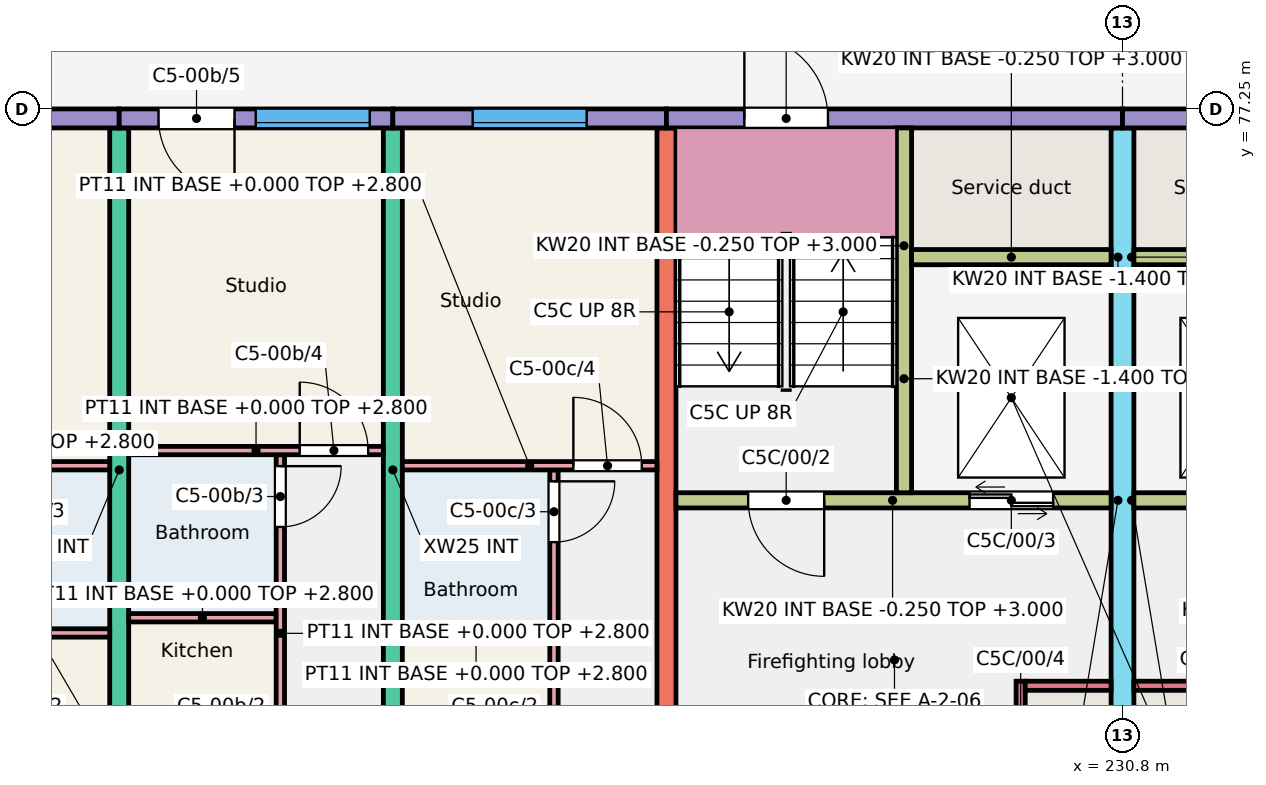
"""IFC4 building model, lengths in metres.
Left out: names, types, materials, properties, quantities, classifications, styles, units other than length and angle.
Written with IfcOpenShell. Run it as: python <this file> out.ifc"""

import sys

from ifc_helpers import new_model, si_unit, direction, frame, frame_2d, origin, place, context, subcontext, project, spatial, rectangle, extrude, element, fill, save


model = new_model("IFC4")
c1 = context("Model", 3, precision=1e-05, world=origin(), true_north=direction((0.0, 1.0)))
c2 = subcontext(c1, "Body", "Model", "MODEL_VIEW")
j1 = project(units=[si_unit("LENGTHUNIT", "METRE"), si_unit("PLANEANGLEUNIT", "RADIAN")], contexts=[c1])
p1 = place(None, origin())
s1 = spatial("IfcSite", under=j1, at=p1, CompositionType="ELEMENT")
p2 = place(p1, origin())
s2 = spatial("IfcBuilding", under=s1, at=p2, CompositionType="ELEMENT")
p3 = place(p2, origin())
s3 = spatial("IfcBuildingStorey", under=s2, at=p3, CompositionType="ELEMENT", Elevation=0.0)
for number, where, z_axis, x_axis in (
    (1, (217.6, 68.0, -0.25), (0.0, 0.0, 1.0), (0.0, 1.0, 0.0)),
    (2, (221.2, 68.0, -0.25), (0.0, 0.0, 1.0), (0.0, 1.0, 0.0)),
    (3, (224.8, 68.0, -0.25), (0.0, 0.0, 1.0), (0.0, 1.0, 0.0)),
):
    element("IfcWall", number, at=place(p3, frame(where, z_axis=z_axis, x_axis=x_axis)), inside=s3, PredefinedType="SHEAR", context=c2, shape_type="SweptSolid", body=[
        extrude(rectangle(XDim=9.0, YDim=0.25, at=frame_2d((4.5, 0.0))), origin(), (0.0, 0.0, 1.0), 3.25),
    ])
p4 = place(p3, frame((230.8, 66.0, -0.25), z_axis=(0.0, 0.0, 1.0), x_axis=(0.0, 1.0, 0.0)))
e4 = element("IfcWall", 4, at=p4, inside=s3, PredefinedType="SHEAR", context=c2, shape_type="SweptSolid", body=[
    extrude(rectangle(XDim=11.0, YDim=0.3, at=frame_2d((5.5, 0.0))), origin(), (0.0, 0.0, 1.0), 3.25),
])
p5 = place(p4, frame((0.3, 0.0, 0.25)))
e5 = element("IfcOpeningElement", 5, at=p5, cuts=e4, PredefinedType="OPENING", context=c2, shape_type="SweptSolid", body=[
    extrude(rectangle(XDim=1.2, YDim=2.1, at=frame_2d((0.6, 1.05))), frame((0.0, 0.16, 0.0), z_axis=(0.0, -1.0, 0.0), x_axis=(1.0, 0.0, 0.0)), (0.0, 0.0, 1.0), 0.32),
])
p6 = place(p3, frame((214.0, 77.125, -0.25), z_axis=(0.0, 0.0, 1.0), x_axis=(1.0, 0.0, 0.0)))
e6 = element("IfcWall", 6, at=p6, inside=s3, PredefinedType="SOLIDWALL", context=c2, shape_type="SweptSolid", body=[
    extrude(rectangle(XDim=3.6, YDim=0.25, at=frame_2d((1.8, 0.0))), origin(), (0.0, 0.0, 1.0), 3.25),
])
p7 = place(p6, frame((1.062, 0.0, 1.15)))
e7 = element("IfcOpeningElement", 7, at=p7, cuts=e6, PredefinedType="OPENING", context=c2, shape_type="SweptSolid", body=[
    extrude(rectangle(XDim=1.5, YDim=1.5, at=frame_2d((0.75, 0.75))), frame((0.0, 0.135, 0.0), z_axis=(0.0, -1.0, 0.0), x_axis=(1.0, 0.0, 0.0)), (0.0, 0.0, 1.0), 0.27),
])
p8 = place(p3, frame((217.6, 77.125, -0.25), z_axis=(0.0, 0.0, 1.0), x_axis=(1.0, 0.0, 0.0)))
e8 = element("IfcWall", 8, at=p8, inside=s3, PredefinedType="SOLIDWALL", context=c2, shape_type="SweptSolid", body=[
    extrude(rectangle(XDim=3.6, YDim=0.25, at=frame_2d((1.8, 0.0))), origin(), (0.0, 0.0, 1.0), 3.25),
])
p9 = place(p8, frame((1.796, 0.0, 1.15)))
e9 = element("IfcOpeningElement", 9, at=p9, cuts=e8, PredefinedType="OPENING", context=c2, shape_type="SweptSolid", body=[
    extrude(rectangle(XDim=1.5, YDim=1.5, at=frame_2d((0.75, 0.75))), frame((0.0, 0.135, 0.0), z_axis=(0.0, -1.0, 0.0), x_axis=(1.0, 0.0, 0.0)), (0.0, 0.0, 1.0), 0.27),
])
p10 = place(p8, frame((0.517, 0.0, 0.25)))
e10 = element("IfcOpeningElement", 10, at=p10, cuts=e8, PredefinedType="OPENING", context=c2, shape_type="SweptSolid", body=[
    extrude(rectangle(XDim=1.0, YDim=2.1, at=frame_2d((0.5, 1.05))), frame((0.0, 0.135, 0.0), z_axis=(0.0, -1.0, 0.0), x_axis=(1.0, 0.0, 0.0)), (0.0, 0.0, 1.0), 0.27),
])
p11 = place(p3, frame((221.2, 77.125, -0.25), z_axis=(0.0, 0.0, 1.0), x_axis=(1.0, 0.0, 0.0)))
e11 = element("IfcWall", 11, at=p11, inside=s3, PredefinedType="SOLIDWALL", context=c2, shape_type="SweptSolid", body=[
    extrude(rectangle(XDim=3.6, YDim=0.25, at=frame_2d((1.8, 0.0))), origin(), (0.0, 0.0, 1.0), 3.25),
])
p12 = place(p11, frame((1.05, 0.0, 1.15)))
e12 = element("IfcOpeningElement", 12, at=p12, cuts=e11, PredefinedType="OPENING", context=c2, shape_type="SweptSolid", body=[
    extrude(rectangle(XDim=1.5, YDim=1.5, at=frame_2d((0.75, 0.75))), frame((0.0, 0.135, 0.0), z_axis=(0.0, -1.0, 0.0), x_axis=(1.0, 0.0, 0.0)), (0.0, 0.0, 1.0), 0.27),
])
p13 = place(p3, frame((224.8, 77.125, -0.25), z_axis=(0.0, 0.0, 1.0), x_axis=(1.0, 0.0, 0.0)))
e13 = element("IfcWall", 13, at=p13, inside=s3, PredefinedType="SOLIDWALL", context=c2, shape_type="SweptSolid", body=[
    extrude(rectangle(XDim=6.0, YDim=0.25, at=frame_2d((3.0, 0.0))), origin(), (0.0, 0.0, 1.0), 3.25),
])
p14 = place(p13, frame((1.025, 0.0, 0.25)))
e14 = element("IfcOpeningElement", 14, at=p14, cuts=e13, PredefinedType="OPENING", context=c2, shape_type="SweptSolid", body=[
    extrude(rectangle(XDim=1.1, YDim=2.1, at=frame_2d((0.55, 1.05))), frame((0.0, 0.135, 0.0), z_axis=(0.0, -1.0, 0.0), x_axis=(1.0, 0.0, 0.0)), (0.0, 0.0, 1.0), 0.27),
])
p15 = place(p3, frame((224.925, 72.1, -0.25), z_axis=(0.0, 0.0, 1.0), x_axis=(1.0, 0.0, 0.0)))
e15 = element("IfcWall", 15, at=p15, inside=s3, PredefinedType="SHEAR", context=c2, shape_type="SweptSolid", body=[
    extrude(rectangle(XDim=5.725, YDim=0.2, at=frame_2d((2.862, 0.0))), origin(), (0.0, 0.0, 1.0), 3.25),
])
p16 = place(p15, frame((0.95, 0.0, 0.25)))
e16 = element("IfcOpeningElement", 16, at=p16, cuts=e15, PredefinedType="OPENING", context=c2, shape_type="SweptSolid", body=[
    extrude(rectangle(XDim=1.0, YDim=2.1, at=frame_2d((0.5, 1.05))), frame((0.0, 0.11, 0.0), z_axis=(0.0, -1.0, 0.0), x_axis=(1.0, 0.0, 0.0)), (0.0, 0.0, 1.0), 0.22),
])
p17 = place(p15, frame((3.863, 0.0, 0.25)))
e17 = element("IfcOpeningElement", 17, at=p17, cuts=e15, PredefinedType="OPENING", context=c2, shape_type="SweptSolid", body=[
    extrude(rectangle(XDim=1.1, YDim=2.1, at=frame_2d((0.55, 1.05))), frame((0.0, 0.11, 0.0), z_axis=(0.0, -1.0, 0.0), x_axis=(1.0, 0.0, 0.0)), (0.0, 0.0, 1.0), 0.22),
])
p18 = place(p3, frame((227.925, 72.2, -0.25), z_axis=(0.0, 0.0, 1.0), x_axis=(0.0, 1.0, 0.0)))
e18 = element("IfcWall", 18, at=p18, inside=s3, PredefinedType="SHEAR", context=c2, shape_type="SweptSolid", body=[
    extrude(rectangle(XDim=4.8, YDim=0.2, at=frame_2d((2.4, 0.0))), origin(), (0.0, 0.0, 1.0), 3.25),
])
p19 = place(p3, frame((228.025, 75.3, -0.25), z_axis=(0.0, 0.0, 1.0), x_axis=(1.0, 0.0, 0.0)))
e19 = element("IfcWall", 19, at=p19, inside=s3, PredefinedType="SHEAR", context=c2, shape_type="SweptSolid", body=[
    extrude(rectangle(XDim=2.625, YDim=0.2, at=frame_2d((1.312, 0.0))), origin(), (0.0, 0.0, 1.0), 3.25),
])
p20 = place(p3, frame((229.46, 68.0, -0.25), z_axis=(0.0, 0.0, 1.0), x_axis=(0.0, 1.0, 0.0)))
e20 = element("IfcWall", 20, at=p20, inside=s3, PredefinedType="SHEAR", context=c2, shape_type="SweptSolid", body=[
    extrude(rectangle(XDim=1.72, YDim=0.12, at=frame_2d((0.86, 0.0))), origin(), (0.0, 0.0, 1.0), 3.25),
])
p21 = place(p20, frame((0.45, 0.0, 0.25)))
e21 = element("IfcOpeningElement", 21, at=p21, cuts=e20, PredefinedType="OPENING", context=c2, shape_type="SweptSolid", body=[
    extrude(rectangle(XDim=0.9, YDim=2.1, at=frame_2d((0.45, 1.05))), frame((0.0, 0.07, 0.0), z_axis=(0.0, -1.0, 0.0), x_axis=(1.0, 0.0, 0.0)), (0.0, 0.0, 1.0), 0.14),
])
p22 = place(p3, frame((229.52, 69.66, -0.25), z_axis=(0.0, 0.0, 1.0), x_axis=(1.0, 0.0, 0.0)))
e22 = element("IfcWall", 22, at=p22, inside=s3, PredefinedType="SHEAR", context=c2, shape_type="SweptSolid", body=[
    extrude(rectangle(XDim=1.13, YDim=0.12, at=frame_2d((0.565, 0.0))), origin(), (0.0, 0.0, 1.0), 3.25),
])
p23 = place(p3, frame((230.8, 77.125, -0.25), z_axis=(0.0, 0.0, 1.0), x_axis=(1.0, 0.0, 0.0)))
e23 = element("IfcWall", 23, at=p23, inside=s3, PredefinedType="SOLIDWALL", context=c2, shape_type="SweptSolid", body=[
    extrude(rectangle(XDim=6.0, YDim=0.25, at=frame_2d((3.0, 0.0))), origin(), (0.0, 0.0, 1.0), 3.25),
])
p24 = place(p23, frame((3.875, 0.0, 0.25)))
e24 = element("IfcOpeningElement", 24, at=p24, cuts=e23, PredefinedType="OPENING", context=c2, shape_type="SweptSolid", body=[
    extrude(rectangle(XDim=1.1, YDim=2.1, at=frame_2d((0.55, 1.05))), frame((0.0, 0.135, 0.0), z_axis=(0.0, -1.0, 0.0), x_axis=(1.0, 0.0, 0.0)), (0.0, 0.0, 1.0), 0.27),
])
p25 = place(p3, frame((230.95, 72.1, -0.25), z_axis=(0.0, 0.0, 1.0), x_axis=(1.0, 0.0, 0.0)))
e25 = element("IfcWall", 25, at=p25, inside=s3, PredefinedType="SHEAR", context=c2, shape_type="SweptSolid", body=[
    extrude(rectangle(XDim=5.725, YDim=0.2, at=frame_2d((2.863, 0.0))), origin(), (0.0, 0.0, 1.0), 3.25),
])
p26 = place(p25, frame((3.775, 0.0, 0.25)))
e26 = element("IfcOpeningElement", 26, at=p26, cuts=e25, PredefinedType="OPENING", context=c2, shape_type="SweptSolid", body=[
    extrude(rectangle(XDim=1.0, YDim=2.1, at=frame_2d((0.5, 1.05))), frame((0.0, 0.11, 0.0), z_axis=(0.0, -1.0, 0.0), x_axis=(1.0, 0.0, 0.0)), (0.0, 0.0, 1.0), 0.22),
])
p27 = place(p25, frame((0.762, 0.0, 0.25)))
e27 = element("IfcOpeningElement", 27, at=p27, cuts=e25, PredefinedType="OPENING", context=c2, shape_type="SweptSolid", body=[
    extrude(rectangle(XDim=1.1, YDim=2.1, at=frame_2d((0.55, 1.05))), frame((0.0, 0.11, 0.0), z_axis=(0.0, -1.0, 0.0), x_axis=(1.0, 0.0, 0.0)), (0.0, 0.0, 1.0), 0.22),
])
p28 = place(p3, frame((230.95, 75.3, -0.25), z_axis=(0.0, 0.0, 1.0), x_axis=(1.0, 0.0, 0.0)))
e28 = element("IfcWall", 28, at=p28, inside=s3, PredefinedType="SHEAR", context=c2, shape_type="SweptSolid", body=[
    extrude(rectangle(XDim=2.625, YDim=0.2, at=frame_2d((1.312, 0.0))), origin(), (0.0, 0.0, 1.0), 3.25),
])
p29 = place(p3, frame((230.95, 69.66, -0.25), z_axis=(0.0, 0.0, 1.0), x_axis=(1.0, 0.0, 0.0)))
e29 = element("IfcWall", 29, at=p29, inside=s3, PredefinedType="SHEAR", context=c2, shape_type="SweptSolid", body=[
    extrude(rectangle(XDim=1.13, YDim=0.12, at=frame_2d((0.565, 0.0))), origin(), (0.0, 0.0, 1.0), 3.25),
])
for number, where, z_axis, x_axis in (
    (30, (227.825, 72.1, -1.4), (0.0, 0.0, 1.0), (1.0, 0.0, 0.0)),
    (31, (227.825, 75.3, -1.4), (0.0, 0.0, 1.0), (1.0, 0.0, 0.0)),
):
    element("IfcWall", number, at=place(p3, frame(where, z_axis=z_axis, x_axis=x_axis)), inside=s3, PredefinedType="SHEAR", context=c2, shape_type="SweptSolid", body=[
        extrude(rectangle(XDim=2.975, YDim=0.2, at=frame_2d((1.488, 0.0))), origin(), (0.0, 0.0, 1.0), 1.15),
    ])
p30 = place(p3, frame((227.925, 72.2, -1.4), z_axis=(0.0, 0.0, 1.0), x_axis=(0.0, 1.0, 0.0)))
e32 = element("IfcWall", 32, at=p30, inside=s3, PredefinedType="SHEAR", context=c2, shape_type="SweptSolid", body=[
    extrude(rectangle(XDim=3.0, YDim=0.2, at=frame_2d((1.5, 0.0))), origin(), (0.0, 0.0, 1.0), 1.15),
])
p31 = place(p3, frame((230.725, 72.2, -1.4), z_axis=(0.0, 0.0, 1.0), x_axis=(0.0, 1.0, 0.0)))
e33 = element("IfcWall", 33, at=p31, inside=s3, PredefinedType="SHEAR", context=c2, shape_type="SweptSolid", body=[
    extrude(rectangle(XDim=3.0, YDim=0.15, at=frame_2d((1.5, 0.0))), origin(), (0.0, 0.0, 1.0), 1.15),
])
for number, where, z_axis, x_axis in (
    (34, (230.8, 72.1, -1.4), (0.0, 0.0, 1.0), (1.0, 0.0, 0.0)),
    (35, (230.8, 75.3, -1.4), (0.0, 0.0, 1.0), (1.0, 0.0, 0.0)),
):
    element("IfcWall", number, at=place(p3, frame(where, z_axis=z_axis, x_axis=x_axis)), inside=s3, PredefinedType="SHEAR", context=c2, shape_type="SweptSolid", body=[
        extrude(rectangle(XDim=2.975, YDim=0.2, at=frame_2d((1.487, 0.0))), origin(), (0.0, 0.0, 1.0), 1.15),
    ])
p32 = place(p3, frame((230.875, 72.2, -1.4), z_axis=(0.0, 0.0, 1.0), x_axis=(0.0, 1.0, 0.0)))
e36 = element("IfcWall", 36, at=p32, inside=s3, PredefinedType="SHEAR", context=c2, shape_type="SweptSolid", body=[
    extrude(rectangle(XDim=3.0, YDim=0.15, at=frame_2d((1.5, 0.0))), origin(), (0.0, 0.0, 1.0), 1.15),
])
p33 = place(p3, frame((215.56, 70.355, 0.0), z_axis=(0.0, 0.0, 1.0), x_axis=(1.0, 0.0, 0.0)))
e37 = element("IfcWall", 37, at=p33, inside=s3, PredefinedType="PARTITIONING", context=c2, shape_type="SweptSolid", body=[
    extrude(rectangle(XDim=1.915, YDim=0.11, at=frame_2d((0.958, 0.0))), origin(), (0.0, 0.0, 1.0), 2.8),
])
p34 = place(p3, frame((214.15, 72.555, 0.0), z_axis=(0.0, 0.0, 1.0), x_axis=(1.0, 0.0, 0.0)))
e38 = element("IfcWall", 38, at=p34, inside=s3, PredefinedType="PARTITIONING", context=c2, shape_type="SweptSolid", body=[
    extrude(rectangle(XDim=3.325, YDim=0.11, at=frame_2d((1.663, 0.0))), origin(), (0.0, 0.0, 1.0), 2.8),
])
p35 = place(p34, frame((0.2, 0.0, 0.0)))
e39 = element("IfcOpeningElement", 39, at=p35, cuts=e38, PredefinedType="OPENING", context=c2, shape_type="SweptSolid", body=[
    extrude(rectangle(XDim=0.9, YDim=2.1, at=frame_2d((0.45, 1.05))), frame((0.0, 0.065, 0.0), z_axis=(0.0, -1.0, 0.0), x_axis=(1.0, 0.0, 0.0)), (0.0, 0.0, 1.0), 0.13),
])
p36 = place(p3, frame((217.725, 70.555, 0.0), z_axis=(0.0, 0.0, 1.0), x_axis=(1.0, 0.0, 0.0)))
e40 = element("IfcWall", 40, at=p36, inside=s3, PredefinedType="PARTITIONING", context=c2, shape_type="SweptSolid", body=[
    extrude(rectangle(XDim=1.94, YDim=0.11, at=frame_2d((0.97, 0.0))), origin(), (0.0, 0.0, 1.0), 2.8),
])
p37 = place(p3, frame((219.72, 68.0, 0.0), z_axis=(0.0, 0.0, 1.0), x_axis=(0.0, 1.0, 0.0)))
e41 = element("IfcWall", 41, at=p37, inside=s3, PredefinedType="PARTITIONING", context=c2, shape_type="SweptSolid", body=[
    extrude(rectangle(XDim=4.7, YDim=0.11, at=frame_2d((2.35, 0.0))), origin(), (0.0, 0.0, 1.0), 2.8),
])
p38 = place(p37, frame((0.2, 0.0, 0.0)))
e42 = element("IfcOpeningElement", 42, at=p38, cuts=e41, PredefinedType="OPENING", context=c2, shape_type="SweptSolid", body=[
    extrude(rectangle(XDim=0.8, YDim=2.1, at=frame_2d((0.4, 1.05))), frame((0.0, 0.065, 0.0), z_axis=(0.0, -1.0, 0.0), x_axis=(1.0, 0.0, 0.0)), (0.0, 0.0, 1.0), 0.13),
])
p39 = place(p37, frame((3.75, 0.0, 0.0)))
e43 = element("IfcOpeningElement", 43, at=p39, cuts=e41, PredefinedType="OPENING", context=c2, shape_type="SweptSolid", body=[
    extrude(rectangle(XDim=0.8, YDim=2.1, at=frame_2d((0.4, 1.05))), frame((0.0, 0.065, 0.0), z_axis=(0.0, -1.0, 0.0), x_axis=(1.0, 0.0, 0.0)), (0.0, 0.0, 1.0), 0.13),
])
p40 = place(p3, frame((217.725, 72.755, 0.0), z_axis=(0.0, 0.0, 1.0), x_axis=(1.0, 0.0, 0.0)))
e44 = element("IfcWall", 44, at=p40, inside=s3, PredefinedType="PARTITIONING", context=c2, shape_type="SweptSolid", body=[
    extrude(rectangle(XDim=3.35, YDim=0.11, at=frame_2d((1.675, 0.0))), origin(), (0.0, 0.0, 1.0), 2.8),
])
p41 = place(p40, frame((2.25, 0.0, 0.0)))
e45 = element("IfcOpeningElement", 45, at=p41, cuts=e44, PredefinedType="OPENING", context=c2, shape_type="SweptSolid", body=[
    extrude(rectangle(XDim=0.9, YDim=2.1, at=frame_2d((0.45, 1.05))), frame((0.0, 0.065, 0.0), z_axis=(0.0, -1.0, 0.0), x_axis=(1.0, 0.0, 0.0)), (0.0, 0.0, 1.0), 0.13),
])
p42 = place(p3, frame((221.325, 70.355, 0.0), z_axis=(0.0, 0.0, 1.0), x_axis=(1.0, 0.0, 0.0)))
e46 = element("IfcWall", 46, at=p42, inside=s3, PredefinedType="PARTITIONING", context=c2, shape_type="SweptSolid", body=[
    extrude(rectangle(XDim=1.94, YDim=0.11, at=frame_2d((0.97, 0.0))), origin(), (0.0, 0.0, 1.0), 2.8),
])
p43 = place(p3, frame((223.32, 68.0, 0.0), z_axis=(0.0, 0.0, 1.0), x_axis=(0.0, 1.0, 0.0)))
e47 = element("IfcWall", 47, at=p43, inside=s3, PredefinedType="PARTITIONING", context=c2, shape_type="SweptSolid", body=[
    extrude(rectangle(XDim=4.5, YDim=0.11, at=frame_2d((2.25, 0.0))), origin(), (0.0, 0.0, 1.0), 2.8),
])
p44 = place(p43, frame((0.2, 0.0, 0.0)))
e48 = element("IfcOpeningElement", 48, at=p44, cuts=e47, PredefinedType="OPENING", context=c2, shape_type="SweptSolid", body=[
    extrude(rectangle(XDim=0.8, YDim=2.1, at=frame_2d((0.4, 1.05))), frame((0.0, 0.065, 0.0), z_axis=(0.0, -1.0, 0.0), x_axis=(1.0, 0.0, 0.0)), (0.0, 0.0, 1.0), 0.13),
])
p45 = place(p43, frame((3.55, 0.0, 0.0)))
e49 = element("IfcOpeningElement", 49, at=p45, cuts=e47, PredefinedType="OPENING", context=c2, shape_type="SweptSolid", body=[
    extrude(rectangle(XDim=0.8, YDim=2.1, at=frame_2d((0.4, 1.05))), frame((0.0, 0.065, 0.0), z_axis=(0.0, -1.0, 0.0), x_axis=(1.0, 0.0, 0.0)), (0.0, 0.0, 1.0), 0.13),
])
p46 = place(p3, frame((221.325, 72.555, 0.0), z_axis=(0.0, 0.0, 1.0), x_axis=(1.0, 0.0, 0.0)))
e50 = element("IfcWall", 50, at=p46, inside=s3, PredefinedType="PARTITIONING", context=c2, shape_type="SweptSolid", body=[
    extrude(rectangle(XDim=3.35, YDim=0.11, at=frame_2d((1.675, 0.0))), origin(), (0.0, 0.0, 1.0), 2.8),
])
p47 = place(p46, frame((2.25, 0.0, 0.0)))
e51 = element("IfcOpeningElement", 51, at=p47, cuts=e50, PredefinedType="OPENING", context=c2, shape_type="SweptSolid", body=[
    extrude(rectangle(XDim=0.9, YDim=2.1, at=frame_2d((0.45, 1.05))), frame((0.0, 0.065, 0.0), z_axis=(0.0, -1.0, 0.0), x_axis=(1.0, 0.0, 0.0)), (0.0, 0.0, 1.0), 0.13),
])
p48 = place(p9, origin())
e52 = element("IfcWindow", 52, at=p48, inside=s3, PartitioningType="SINGLE_PANEL", PredefinedType="WINDOW", context=c2, shape_type="SweptSolid", body=[
    extrude(rectangle(XDim=1.5, YDim=1.5, at=frame_2d((0.75, 0.75))), frame((0.0, -0.025, 0.0), z_axis=(0.0, -1.0, 0.0), x_axis=(1.0, 0.0, 0.0)), (0.0, 0.0, 1.0), 0.06),
])
fill(e9, e52)
p49 = place(p12, origin())
e53 = element("IfcWindow", 53, at=p49, inside=s3, PartitioningType="SINGLE_PANEL", PredefinedType="WINDOW", context=c2, shape_type="SweptSolid", body=[
    extrude(rectangle(XDim=1.5, YDim=1.5, at=frame_2d((0.75, 0.75))), frame((0.0, -0.025, 0.0), z_axis=(0.0, -1.0, 0.0), x_axis=(1.0, 0.0, 0.0)), (0.0, 0.0, 1.0), 0.06),
])
fill(e12, e53)
p50 = place(p39, origin())
e54 = element("IfcDoor", 54, at=p50, inside=s3, OperationType="SINGLE_SWING_RIGHT", PredefinedType="DOOR", context=c2, shape_type="SweptSolid", body=[
    extrude(rectangle(XDim=0.8, YDim=2.1, at=frame_2d((0.4, 1.05))), frame((0.0, 0.025, 0.0), z_axis=(0.0, -1.0, 0.0), x_axis=(1.0, 0.0, 0.0)), (0.0, 0.0, 1.0), 0.05),
])
fill(e43, e54)
p51 = place(p41, origin())
e55 = element("IfcDoor", 55, at=p51, inside=s3, OperationType="SINGLE_SWING_LEFT", PredefinedType="DOOR", context=c2, shape_type="SweptSolid", body=[
    extrude(rectangle(XDim=0.9, YDim=2.1, at=frame_2d((0.45, 1.05))), frame((0.0, 0.025, 0.0), z_axis=(0.0, -1.0, 0.0), x_axis=(1.0, 0.0, 0.0)), (0.0, 0.0, 1.0), 0.05),
])
fill(e45, e55)
p52 = place(p10, origin())
e56 = element("IfcDoor", 56, at=p52, inside=s3, OperationType="SINGLE_SWING_RIGHT", PredefinedType="DOOR", context=c2, shape_type="SweptSolid", body=[
    extrude(rectangle(XDim=1.0, YDim=2.1, at=frame_2d((0.5, 1.05))), frame((0.0, 0.025, 0.0), z_axis=(0.0, -1.0, 0.0), x_axis=(1.0, 0.0, 0.0)), (0.0, 0.0, 1.0), 0.05),
])
fill(e10, e56)
p53 = place(p45, origin())
e57 = element("IfcDoor", 57, at=p53, inside=s3, OperationType="SINGLE_SWING_RIGHT", PredefinedType="DOOR", context=c2, shape_type="SweptSolid", body=[
    extrude(rectangle(XDim=0.8, YDim=2.1, at=frame_2d((0.4, 1.05))), frame((0.0, 0.025, 0.0), z_axis=(0.0, -1.0, 0.0), x_axis=(1.0, 0.0, 0.0)), (0.0, 0.0, 1.0), 0.05),
])
fill(e49, e57)
p54 = place(p47, origin())
e58 = element("IfcDoor", 58, at=p54, inside=s3, OperationType="SINGLE_SWING_LEFT", PredefinedType="DOOR", context=c2, shape_type="SweptSolid", body=[
    extrude(rectangle(XDim=0.9, YDim=2.1, at=frame_2d((0.45, 1.05))), frame((0.0, 0.025, 0.0), z_axis=(0.0, -1.0, 0.0), x_axis=(1.0, 0.0, 0.0)), (0.0, 0.0, 1.0), 0.05),
])
fill(e51, e58)
p55 = place(p16, origin())
e59 = element("IfcDoor", 59, at=p55, inside=s3, OperationType="SINGLE_SWING_RIGHT", PredefinedType="DOOR", context=c2, shape_type="SweptSolid", body=[
    extrude(rectangle(XDim=1.0, YDim=2.1, at=frame_2d((0.5, 1.05))), frame((0.0, 0.025, 0.0), z_axis=(0.0, -1.0, 0.0), x_axis=(1.0, 0.0, 0.0)), (0.0, 0.0, 1.0), 0.05),
])
fill(e16, e59)
p56 = place(p17, origin())
e60 = element("IfcDoor", 60, at=p56, inside=s3, OperationType="DOUBLE_DOOR_SLIDING", PredefinedType="DOOR", context=c2, shape_type="SweptSolid", body=[
    extrude(rectangle(XDim=1.1, YDim=2.1, at=frame_2d((0.55, 1.05))), frame((0.0, 0.025, 0.0), z_axis=(0.0, -1.0, 0.0), x_axis=(1.0, 0.0, 0.0)), (0.0, 0.0, 1.0), 0.05),
])
fill(e17, e60)
p57 = place(p14, origin())
e61 = element("IfcDoor", 61, at=p57, inside=s3, OperationType="SINGLE_SWING_LEFT", PredefinedType="DOOR", context=c2, shape_type="SweptSolid", body=[
    extrude(rectangle(XDim=1.1, YDim=2.1, at=frame_2d((0.55, 1.05))), frame((0.0, 0.025, 0.0), z_axis=(0.0, -1.0, 0.0), x_axis=(1.0, 0.0, 0.0)), (0.0, 0.0, 1.0), 0.05),
])
fill(e14, e61)
save(model, sys.argv[1])
